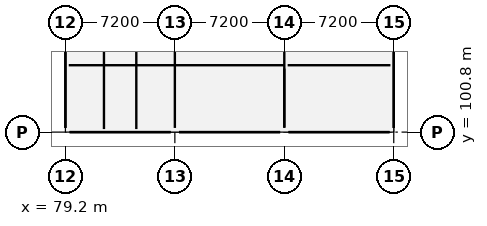
"""IFC4 building model, lengths in metres.
Left out: names, types, materials, properties, quantities, classifications, styles, units other than length and angle.
Written with IfcOpenShell. Run it as: python <this file> out.ifc"""

import sys

from ifc_helpers import new_model, si_unit, direction, frame, frame_2d, origin, origin_2d, place, context, subcontext, project, spatial, rectangle, extrude, element, fill, save


model = new_model("IFC4")
c1 = context("Model", 3, precision=1e-05, world=origin(), true_north=direction((0.0, 1.0)))
c2 = subcontext(c1, "Body", "Model", "MODEL_VIEW")
j1 = project(units=[si_unit("LENGTHUNIT", "METRE"), si_unit("PLANEANGLEUNIT", "RADIAN")], contexts=[c1])
p1 = place(None, origin())
s1 = spatial("IfcSite", under=j1, at=p1, CompositionType="ELEMENT")
p2 = place(p1, origin())
s2 = spatial("IfcBuilding", under=s1, at=p2, CompositionType="ELEMENT")
p3 = place(p2, frame((0.0, 0.0, 17.4)))
s3 = spatial("IfcBuildingStorey", under=s2, at=p3, CompositionType="ELEMENT", Elevation=17.4)
for number, where, z_axis, x_axis in (
    (1, (79.2, 100.8, 0.0), (0.0, 0.0, 1.0), (1.0, 0.0, 0.0)),
    (2, (86.4, 100.8, 0.0), (0.0, 0.0, 1.0), (1.0, 0.0, 0.0)),
    (3, (93.6, 100.8, 0.0), (0.0, 0.0, 1.0), (1.0, 0.0, 0.0)),
    (4, (100.8, 100.8, 0.0), (0.0, 0.0, 1.0), (1.0, 0.0, 0.0)),
):
    element("IfcColumn", number, at=place(p3, frame(where, z_axis=z_axis, x_axis=x_axis)), inside=s3, PredefinedType="COLUMN", context=c2, shape_type="SweptSolid", body=[
        extrude(rectangle(XDim=0.55, YDim=0.55, at=origin_2d()), origin(), (0.0, 0.0, 1.0), 3.9),
    ])
p4 = place(p3, frame((100.8, 101.075, 0.0), z_axis=(0.0, 0.0, 1.0), x_axis=(0.0, 1.0, 0.0)))
e5 = element("IfcWall", 5, at=p4, inside=s3, PredefinedType="ELEMENTEDWALL", context=c2, shape_type="SweptSolid", body=[
    extrude(rectangle(XDim=6.65, YDim=0.28, at=frame_2d((3.325, 0.0))), origin(), (0.0, 0.0, 1.0), 2.99),
])
p5 = place(p4, frame((2.675, 0.0, 0.85)))
e6 = element("IfcOpeningElement", 6, at=p5, cuts=e5, PredefinedType="OPENING", context=c2, shape_type="SweptSolid", body=[
    extrude(rectangle(XDim=1.3, YDim=1.85, at=frame_2d((0.65, 0.925))), frame((0.0, 0.152, 0.0), z_axis=(0.0, -1.0, 0.0), x_axis=(1.0, 0.0, 0.0)), (0.0, 0.0, 1.0), 0.304),
])
p6 = place(p3, frame((79.2, 107.725, 0.0), z_axis=(0.0, 0.0, 1.0), x_axis=(0.0, -1.0, 0.0)))
e7 = element("IfcWall", 7, at=p6, inside=s3, PredefinedType="ELEMENTEDWALL", context=c2, shape_type="SweptSolid", body=[
    extrude(rectangle(XDim=6.65, YDim=0.28, at=frame_2d((3.325, 0.0))), origin(), (0.0, 0.0, 1.0), 2.99),
])
p7 = place(p3, frame((79.475, 100.8, 0.0), z_axis=(0.0, 0.0, 1.0), x_axis=(1.0, 0.0, 0.0)))
e8 = element("IfcWall", 8, at=p7, inside=s3, PredefinedType="ELEMENTEDWALL", context=c2, shape_type="SweptSolid", body=[
    extrude(rectangle(XDim=6.65, YDim=0.28, at=frame_2d((3.325, 0.0))), origin(), (0.0, 0.0, 1.0), 2.94),
])
p8 = place(p3, frame((86.675, 100.8, 0.0), z_axis=(0.0, 0.0, 1.0), x_axis=(1.0, 0.0, 0.0)))
e9 = element("IfcWall", 9, at=p8, inside=s3, PredefinedType="ELEMENTEDWALL", context=c2, shape_type="SweptSolid", body=[
    extrude(rectangle(XDim=6.65, YDim=0.28, at=frame_2d((3.325, 0.0))), origin(), (0.0, 0.0, 1.0), 2.89),
])
p9 = place(p3, frame((93.875, 100.8, 0.0), z_axis=(0.0, 0.0, 1.0), x_axis=(1.0, 0.0, 0.0)))
e10 = element("IfcWall", 10, at=p9, inside=s3, PredefinedType="ELEMENTEDWALL", context=c2, shape_type="SweptSolid", body=[
    extrude(rectangle(XDim=6.65, YDim=0.28, at=frame_2d((3.325, 0.0))), origin(), (0.0, 0.0, 1.0), 2.94),
])
p10 = place(p3, frame((79.42, 105.2, 0.0), z_axis=(0.0, 0.0, 1.0), x_axis=(1.0, 0.0, 0.0)))
e11 = element("IfcWall", 11, at=p10, inside=s3, PredefinedType="PARTITIONING", context=c2, shape_type="SweptSolid", body=[
    extrude(rectangle(XDim=14.18, YDim=0.12, at=frame_2d((7.09, 0.0))), origin(), (0.0, 0.0, 1.0), 2.988),
])
p11 = place(p10, frame((6.565, 0.0, 0.0)))
e12 = element("IfcOpeningElement", 12, at=p11, cuts=e11, PredefinedType="OPENING", context=c2, shape_type="SweptSolid", body=[
    extrude(rectangle(XDim=1.05, YDim=2.15, at=frame_2d((0.525, 1.075))), frame((0.0, 0.072, 0.0), z_axis=(0.0, -1.0, 0.0), x_axis=(1.0, 0.0, 0.0)), (0.0, 0.0, 1.0), 0.144),
])
p12 = place(p3, frame((93.6, 101.115, 0.0), z_axis=(0.0, 0.0, 1.0), x_axis=(0.0, 1.0, 0.0)))
e13 = element("IfcWall", 13, at=p12, inside=s3, PredefinedType="PARTITIONING", context=c2, shape_type="SweptSolid", body=[
    extrude(rectangle(XDim=3.865, YDim=0.12, at=frame_2d((1.933, 0.0))), origin(), (0.0, 0.0, 1.0), 2.988),
])
p13 = place(p3, frame((93.82, 105.2, 0.0), z_axis=(0.0, 0.0, 1.0), x_axis=(1.0, 0.0, 0.0)))
e14 = element("IfcWall", 14, at=p13, inside=s3, PredefinedType="PLUMBINGWALL", context=c2, shape_type="SweptSolid", body=[
    extrude(rectangle(XDim=6.76, YDim=0.18, at=frame_2d((3.38, 0.0))), origin(), (0.0, 0.0, 1.0), 3.62),
])
p14 = place(p13, frame((2.93, 0.0, 0.0)))
e15 = element("IfcOpeningElement", 15, at=p14, cuts=e14, PredefinedType="OPENING", context=c2, shape_type="SweptSolid", body=[
    extrude(rectangle(XDim=0.9, YDim=2.1, at=frame_2d((0.45, 1.05))), frame((0.0, 0.102, 0.0), z_axis=(0.0, -1.0, 0.0), x_axis=(1.0, 0.0, 0.0)), (0.0, 0.0, 1.0), 0.204),
])
p15 = place(p5, origin())
e16 = element("IfcWindow", 16, at=p15, inside=s3, PartitioningType="SINGLE_PANEL", PredefinedType="WINDOW", context=c2, shape_type="SweptSolid", body=[
    extrude(rectangle(XDim=1.3, YDim=1.85, at=frame_2d((0.65, 0.925))), frame((0.0, 0.03, 0.0), z_axis=(0.0, -1.0, 0.0), x_axis=(1.0, 0.0, 0.0)), (0.0, 0.0, 1.0), 0.06),
])
fill(e6, e16)
p16 = place(p11, origin())
e17 = element("IfcDoor", 17, at=p16, inside=s3, OperationType="SINGLE_SWING_RIGHT", PredefinedType="DOOR", context=c2, shape_type="SweptSolid", body=[
    extrude(rectangle(XDim=1.05, YDim=2.15, at=frame_2d((0.525, 1.075))), frame((0.0, 0.025, 0.0), z_axis=(0.0, -1.0, 0.0), x_axis=(1.0, 0.0, 0.0)), (0.0, 0.0, 1.0), 0.05),
])
fill(e12, e17)
p17 = place(p14, origin())
e18 = element("IfcDoor", 18, at=p17, inside=s3, OperationType="SINGLE_SWING_LEFT", PredefinedType="DOOR", context=c2, shape_type="SweptSolid", body=[
    extrude(rectangle(XDim=0.9, YDim=2.1, at=frame_2d((0.45, 1.05))), frame((0.0, 0.025, 0.0), z_axis=(0.0, -1.0, 0.0), x_axis=(1.0, 0.0, 0.0)), (0.0, 0.0, 1.0), 0.05),
])
fill(e15, e18)
save(model, sys.argv[1])
